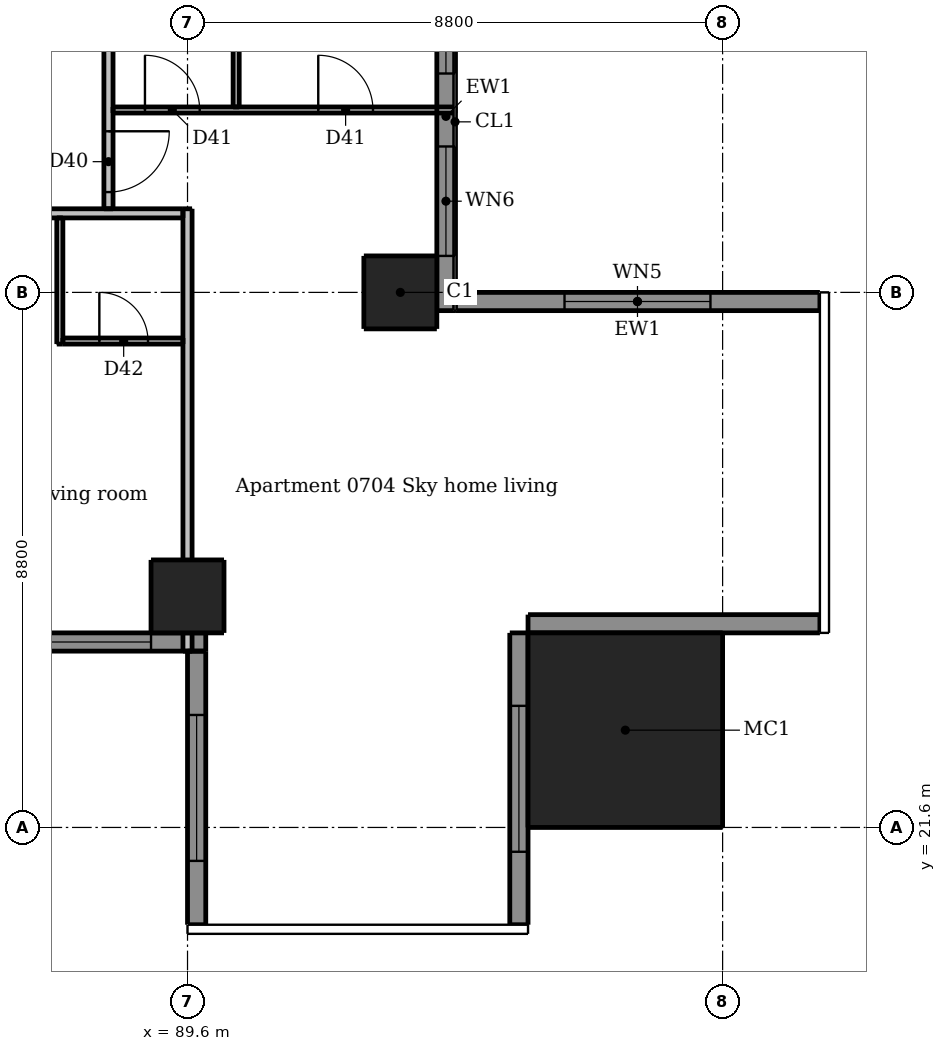
"""IFC4 building model, lengths in metres.
Left out: names, types, materials, properties, quantities, classifications, styles, units other than length and angle.
Written with IfcOpenShell. Run it as: python <this file> out.ifc"""

import sys

from ifc_helpers import new_model, si_unit, direction, frame, frame_2d, origin, origin_2d, place, context, subcontext, project, spatial, rectangle, extrude, element, fill, save


model = new_model("IFC4")
c1 = context("Model", 3, precision=1e-05, world=origin(), true_north=direction((0.0, 1.0)))
c2 = subcontext(c1, "Body", "Model", "MODEL_VIEW")
j1 = project(units=[si_unit("LENGTHUNIT", "METRE"), si_unit("PLANEANGLEUNIT", "RADIAN")], contexts=[c1])
p1 = place(None, origin())
s1 = spatial("IfcSite", under=j1, at=p1, CompositionType="ELEMENT")
p2 = place(p1, origin())
s2 = spatial("IfcBuilding", under=s1, at=p2, CompositionType="ELEMENT")
p3 = place(p2, frame((0.0, 0.0, 30.1)))
s3 = spatial("IfcBuildingStorey", under=s2, at=p3, CompositionType="ELEMENT", Elevation=30.1)
for number, where, z_axis, x_axis in (
    (1, (89.6, 25.4, 0.0), (0.0, 0.0, 1.0), (1.0, 0.0, 0.0)),
    (2, (93.1, 30.4, 0.0), (0.0, 0.0, 1.0), (1.0, 0.0, 0.0)),
):
    element("IfcColumn", number, at=place(p3, frame(where, z_axis=z_axis, x_axis=x_axis)), inside=s3, PredefinedType="COLUMN", context=c2, shape_type="SweptSolid", body=[
        extrude(rectangle(XDim=1.2, YDim=1.2, at=origin_2d()), origin(), (0.0, 0.0, 1.0), 3.05),
    ])
p4 = place(p3, frame((96.8, 23.2, 0.0), z_axis=(0.0, 0.0, 1.0), x_axis=(1.0, 0.0, 0.0)))
e3 = element("IfcColumn", 3, at=p4, inside=s3, PredefinedType="COLUMN", context=c2, shape_type="SweptSolid", body=[
    extrude(rectangle(XDim=3.2, YDim=3.2, at=origin_2d()), origin(), (0.0, 0.0, 1.0), 3.3),
])
p5 = place(p3, frame((89.75, 24.5, 0.0), z_axis=(0.0, 0.0, 1.0), x_axis=(0.0, -1.0, 0.0)))
e4 = element("IfcWall", 4, at=p5, inside=s3, PredefinedType="SOLIDWALL", context=c2, shape_type="SweptSolid", body=[
    extrude(rectangle(XDim=4.5, YDim=0.3, at=frame_2d((2.25, 0.0))), origin(), (0.0, 0.0, 1.0), 3.05),
])
p6 = place(p5, frame((1.05, 0.0, 0.15)))
e5 = element("IfcOpeningElement", 5, at=p6, cuts=e4, PredefinedType="OPENING", context=c2, shape_type="SweptSolid", body=[
    extrude(rectangle(XDim=2.4, YDim=2.1, at=frame_2d((1.2, 1.05))), frame((0.0, 0.16, 0.0), z_axis=(0.0, -1.0, 0.0), x_axis=(1.0, 0.0, 0.0)), (0.0, 0.0, 1.0), 0.32),
])
p7 = place(p3, frame((95.05, 20.0, 0.0), z_axis=(0.0, 0.0, 1.0), x_axis=(0.0, 1.0, 0.0)))
e6 = element("IfcWall", 6, at=p7, inside=s3, PredefinedType="SOLIDWALL", context=c2, shape_type="SweptSolid", body=[
    extrude(rectangle(XDim=4.8, YDim=0.3, at=frame_2d((2.4, 0.0))), origin(), (0.0, 0.0, 1.0), 3.05),
])
p8 = place(p7, frame((1.2, 0.0, 0.15)))
e7 = element("IfcOpeningElement", 7, at=p8, cuts=e6, PredefinedType="OPENING", context=c2, shape_type="SweptSolid", body=[
    extrude(rectangle(XDim=2.4, YDim=2.1, at=frame_2d((1.2, 1.05))), frame((0.0, 0.16, 0.0), z_axis=(0.0, -1.0, 0.0), x_axis=(1.0, 0.0, 0.0)), (0.0, 0.0, 1.0), 0.32),
])
p9 = place(p3, frame((95.2, 24.95, 0.0), z_axis=(0.0, 0.0, 1.0), x_axis=(1.0, 0.0, 0.0)))
e8 = element("IfcWall", 8, at=p9, inside=s3, PredefinedType="SOLIDWALL", context=c2, shape_type="SweptSolid", body=[
    extrude(rectangle(XDim=4.8, YDim=0.3, at=frame_2d((2.4, 0.0))), origin(), (0.0, 0.0, 1.0), 3.05),
])
p10 = place(p3, frame((100.0, 30.25, 0.0), z_axis=(0.0, 0.0, 1.0), x_axis=(-1.0, 0.0, 0.0)))
e9 = element("IfcWall", 9, at=p10, inside=s3, PredefinedType="SOLIDWALL", context=c2, shape_type="SweptSolid", body=[
    extrude(rectangle(XDim=6.0, YDim=0.3, at=frame_2d((3.0, 0.0))), origin(), (0.0, 0.0, 1.0), 3.05),
])
p11 = place(p10, frame((1.8, 0.0, 0.15)))
e10 = element("IfcOpeningElement", 10, at=p11, cuts=e9, PredefinedType="OPENING", context=c2, shape_type="SweptSolid", body=[
    extrude(rectangle(XDim=2.4, YDim=2.1, at=frame_2d((1.2, 1.05))), frame((0.0, 0.16, 0.0), z_axis=(0.0, -1.0, 0.0), x_axis=(1.0, 0.0, 0.0)), (0.0, 0.0, 1.0), 0.32),
])
p12 = place(p3, frame((83.9, 24.65, 0.0), z_axis=(0.0, 0.0, 1.0), x_axis=(1.0, 0.0, 0.0)))
e11 = element("IfcWall", 11, at=p12, inside=s3, PredefinedType="SOLIDWALL", context=c2, shape_type="SweptSolid", body=[
    extrude(rectangle(XDim=6.0, YDim=0.3, at=frame_2d((3.0, 0.0))), origin(), (0.0, 0.0, 1.0), 3.05),
])
p13 = place(p12, frame((0.3, 0.0, 0.15)))
e12 = element("IfcOpeningElement", 12, at=p13, cuts=e11, PredefinedType="OPENING", context=c2, shape_type="SweptSolid", body=[
    extrude(rectangle(XDim=1.8, YDim=2.1, at=frame_2d((0.9, 1.05))), frame((0.0, 0.16, 0.0), z_axis=(0.0, -1.0, 0.0), x_axis=(1.0, 0.0, 0.0)), (0.0, 0.0, 1.0), 0.32),
])
p14 = place(p12, frame((3.3, 0.0, 0.15)))
e13 = element("IfcOpeningElement", 13, at=p14, cuts=e11, PredefinedType="OPENING", context=c2, shape_type="SweptSolid", body=[
    extrude(rectangle(XDim=1.8, YDim=2.1, at=frame_2d((0.9, 1.05))), frame((0.0, 0.16, 0.0), z_axis=(0.0, -1.0, 0.0), x_axis=(1.0, 0.0, 0.0)), (0.0, 0.0, 1.0), 0.32),
])
p15 = place(p3, frame((93.85, 30.1, 0.0), z_axis=(0.0, 0.0, 1.0), x_axis=(0.0, 1.0, 0.0)))
e14 = element("IfcWall", 14, at=p15, inside=s3, PredefinedType="SOLIDWALL", context=c2, shape_type="SweptSolid", body=[
    extrude(rectangle(XDim=6.39, YDim=0.3, at=frame_2d((3.195, 0.0))), origin(), (0.0, 0.0, 1.0), 3.05),
])
p16 = place(p15, frame((0.9, 0.0, 0.15)))
e15 = element("IfcOpeningElement", 15, at=p16, cuts=e14, PredefinedType="OPENING", context=c2, shape_type="SweptSolid", body=[
    extrude(rectangle(XDim=1.8, YDim=2.1, at=frame_2d((0.9, 1.05))), frame((0.0, 0.16, 0.0), z_axis=(0.0, -1.0, 0.0), x_axis=(1.0, 0.0, 0.0)), (0.0, 0.0, 1.0), 0.32),
])
p17 = place(p15, frame((3.9, 0.0, 0.15)))
e16 = element("IfcOpeningElement", 16, at=p17, cuts=e14, PredefinedType="OPENING", context=c2, shape_type="SweptSolid", body=[
    extrude(rectangle(XDim=1.8, YDim=2.1, at=frame_2d((0.9, 1.05))), frame((0.0, 0.16, 0.0), z_axis=(0.0, -1.0, 0.0), x_axis=(1.0, 0.0, 0.0)), (0.0, 0.0, 1.0), 0.32),
])
p18 = place(p3, frame((87.5, 29.55, 0.0), z_axis=(0.0, 0.0, 1.0), x_axis=(0.0, 1.0, 0.0)))
e17 = element("IfcWall", 17, at=p18, inside=s3, PredefinedType="PARTITIONING", context=c2, shape_type="SweptSolid", body=[
    extrude(rectangle(XDim=2.075, YDim=0.1, at=frame_2d((1.038, 0.0))), origin(), (0.0, 0.0, 1.0), 3.05),
])
p19 = place(p3, frame((90.4, 33.45, 0.0), z_axis=(0.0, 0.0, 1.0), x_axis=(0.0, 1.0, 0.0)))
e18 = element("IfcWall", 18, at=p19, inside=s3, PredefinedType="PARTITIONING", context=c2, shape_type="SweptSolid", body=[
    extrude(rectangle(XDim=8.5, YDim=0.1, at=frame_2d((4.25, 0.0))), origin(), (0.0, 0.0, 1.0), 3.05),
])
p20 = place(p19, frame((3.8, 0.0, 0.0)))
e19 = element("IfcOpeningElement", 19, at=p20, cuts=e18, PredefinedType="OPENING", context=c2, shape_type="SweptSolid", body=[
    extrude(rectangle(XDim=0.8, YDim=2.1, at=frame_2d((0.4, 1.05))), frame((0.0, 0.06, 0.0), z_axis=(0.0, -1.0, 0.0), x_axis=(1.0, 0.0, 0.0)), (0.0, 0.0, 1.0), 0.12),
])
p21 = place(p19, frame((6.8, 0.0, 0.0)))
e20 = element("IfcOpeningElement", 20, at=p21, cuts=e18, PredefinedType="OPENING", context=c2, shape_type="SweptSolid", body=[
    extrude(rectangle(XDim=0.9, YDim=2.1, at=frame_2d((0.45, 1.05))), frame((0.0, 0.06, 0.0), z_axis=(0.0, -1.0, 0.0), x_axis=(1.0, 0.0, 0.0)), (0.0, 0.0, 1.0), 0.12),
])
p22 = place(p3, frame((88.375, 33.4, 0.0), z_axis=(0.0, 0.0, 1.0), x_axis=(1.0, 0.0, 0.0)))
e21 = element("IfcWall", 21, at=p22, inside=s3, PredefinedType="PARTITIONING", context=c2, shape_type="SweptSolid", body=[
    extrude(rectangle(XDim=5.625, YDim=0.1, at=frame_2d((2.812, 0.0))), origin(), (0.0, 0.0, 1.0), 3.05),
])
p23 = place(p22, frame((0.525, 0.0, 0.0)))
e22 = element("IfcOpeningElement", 22, at=p23, cuts=e21, PredefinedType="OPENING", context=c2, shape_type="SweptSolid", body=[
    extrude(rectangle(XDim=0.9, YDim=2.1, at=frame_2d((0.45, 1.05))), frame((0.0, 0.06, 0.0), z_axis=(0.0, -1.0, 0.0), x_axis=(1.0, 0.0, 0.0)), (0.0, 0.0, 1.0), 0.12),
])
p24 = place(p22, frame((3.375, 0.0, 0.0)))
e23 = element("IfcOpeningElement", 23, at=p24, cuts=e21, PredefinedType="OPENING", context=c2, shape_type="SweptSolid", body=[
    extrude(rectangle(XDim=0.9, YDim=2.1, at=frame_2d((0.45, 1.05))), frame((0.0, 0.06, 0.0), z_axis=(0.0, -1.0, 0.0), x_axis=(1.0, 0.0, 0.0)), (0.0, 0.0, 1.0), 0.12),
])
p25 = place(p3, frame((87.55, 29.6, 0.0), z_axis=(0.0, 0.0, 1.0), x_axis=(1.0, 0.0, 0.0)))
e24 = element("IfcWall", 24, at=p25, inside=s3, PredefinedType="PARTITIONING", context=c2, shape_type="SweptSolid", body=[
    extrude(rectangle(XDim=1.975, YDim=0.1, at=frame_2d((0.987, 0.0))), origin(), (0.0, 0.0, 1.0), 3.05),
])
p26 = place(p25, frame((0.6, 0.0, 0.0)))
e25 = element("IfcOpeningElement", 25, at=p26, cuts=e24, PredefinedType="OPENING", context=c2, shape_type="SweptSolid", body=[
    extrude(rectangle(XDim=0.8, YDim=2.1, at=frame_2d((0.4, 1.05))), frame((0.0, 0.06, 0.0), z_axis=(0.0, -1.0, 0.0), x_axis=(1.0, 0.0, 0.0)), (0.0, 0.0, 1.0), 0.12),
])
p27 = place(p3, frame((88.3, 60.475, 0.0), z_axis=(0.0, 0.0, 1.0), x_axis=(0.0, -1.0, 0.0)))
e26 = element("IfcWall", 26, at=p27, inside=s3, PredefinedType="PARTITIONING", context=c2, shape_type="SweptSolid", body=[
    extrude(rectangle(XDim=28.7, YDim=0.15, at=frame_2d((14.35, 0.0))), origin(), (0.0, 0.0, 1.0), 3.05),
])
p28 = place(p27, frame((27.425, 0.0, 0.0)))
e27 = element("IfcOpeningElement", 27, at=p28, cuts=e26, PredefinedType="OPENING", context=c2, shape_type="SweptSolid", body=[
    extrude(rectangle(XDim=1.0, YDim=2.1, at=frame_2d((0.5, 1.05))), frame((0.0, 0.085, 0.0), z_axis=(0.0, -1.0, 0.0), x_axis=(1.0, 0.0, 0.0)), (0.0, 0.0, 1.0), 0.17),
])
p29 = place(p27, frame((16.325, 0.0, 0.0)))
e28 = element("IfcOpeningElement", 28, at=p29, cuts=e26, PredefinedType="OPENING", context=c2, shape_type="SweptSolid", body=[
    extrude(rectangle(XDim=1.0, YDim=2.1, at=frame_2d((0.5, 1.05))), frame((0.0, 0.085, 0.0), z_axis=(0.0, -1.0, 0.0), x_axis=(1.0, 0.0, 0.0)), (0.0, 0.0, 1.0), 0.17),
])
p30 = place(p27, frame((5.525, 0.0, 0.0)))
e29 = element("IfcOpeningElement", 29, at=p30, cuts=e26, PredefinedType="OPENING", context=c2, shape_type="SweptSolid", body=[
    extrude(rectangle(XDim=1.0, YDim=2.1, at=frame_2d((0.5, 1.05))), frame((0.0, 0.085, 0.0), z_axis=(0.0, -1.0, 0.0), x_axis=(1.0, 0.0, 0.0)), (0.0, 0.0, 1.0), 0.17),
])
p31 = place(p3, frame((89.6, 24.5, 0.0), z_axis=(0.0, 0.0, 1.0), x_axis=(0.0, 1.0, 0.0)))
e30 = element("IfcWall", 30, at=p31, inside=s3, PredefinedType="PARTITIONING", context=c2, shape_type="SweptSolid", body=[
    extrude(rectangle(XDim=7.275, YDim=0.15, at=frame_2d((3.637, 0.0))), origin(), (0.0, 0.0, 1.0), 2.516),
])
p32 = place(p3, frame((89.525, 31.7, 0.0), z_axis=(0.0, 0.0, 1.0), x_axis=(-1.0, 0.0, 0.0)))
e31 = element("IfcWall", 31, at=p32, inside=s3, PredefinedType="PARTITIONING", context=c2, shape_type="SweptSolid", body=[
    extrude(rectangle(XDim=28.75, YDim=0.15, at=frame_2d((14.375, 0.0))), origin(), (0.0, 0.0, 1.0), 3.05),
])
p33 = place(p32, frame((24.625, 0.0, 0.0)))
e32 = element("IfcOpeningElement", 32, at=p33, cuts=e31, PredefinedType="OPENING", context=c2, shape_type="SweptSolid", body=[
    extrude(rectangle(XDim=1.0, YDim=2.1, at=frame_2d((0.5, 1.05))), frame((0.0, 0.085, 0.0), z_axis=(0.0, -1.0, 0.0), x_axis=(1.0, 0.0, 0.0)), (0.0, 0.0, 1.0), 0.17),
])
p34 = place(p32, frame((10.225, 0.0, 0.0)))
e33 = element("IfcOpeningElement", 33, at=p34, cuts=e31, PredefinedType="OPENING", context=c2, shape_type="SweptSolid", body=[
    extrude(rectangle(XDim=1.0, YDim=2.1, at=frame_2d((0.5, 1.05))), frame((0.0, 0.085, 0.0), z_axis=(0.0, -1.0, 0.0), x_axis=(1.0, 0.0, 0.0)), (0.0, 0.0, 1.0), 0.17),
])
p35 = place(p32, frame((2.425, 0.0, 0.0)))
e34 = element("IfcOpeningElement", 34, at=p35, cuts=e31, PredefinedType="OPENING", context=c2, shape_type="SweptSolid", body=[
    extrude(rectangle(XDim=1.0, YDim=2.1, at=frame_2d((0.5, 1.05))), frame((0.0, 0.085, 0.0), z_axis=(0.0, -1.0, 0.0), x_axis=(1.0, 0.0, 0.0)), (0.0, 0.0, 1.0), 0.17),
])
p36 = place(p6, origin())
e35 = element("IfcWindow", 35, at=p36, inside=s3, PartitioningType="DOUBLE_PANEL_VERTICAL", PredefinedType="WINDOW", context=c2, shape_type="SweptSolid", body=[
    extrude(rectangle(XDim=2.4, YDim=2.1, at=frame_2d((1.2, 1.05))), frame((0.0, 0.03, 0.0), z_axis=(0.0, -1.0, 0.0), x_axis=(1.0, 0.0, 0.0)), (0.0, 0.0, 1.0), 0.06),
])
fill(e5, e35)
p37 = place(p8, origin())
e36 = element("IfcWindow", 36, at=p37, inside=s3, PartitioningType="DOUBLE_PANEL_VERTICAL", PredefinedType="WINDOW", context=c2, shape_type="SweptSolid", body=[
    extrude(rectangle(XDim=2.4, YDim=2.1, at=frame_2d((1.2, 1.05))), frame((0.0, 0.03, 0.0), z_axis=(0.0, -1.0, 0.0), x_axis=(1.0, 0.0, 0.0)), (0.0, 0.0, 1.0), 0.06),
])
fill(e7, e36)
p38 = place(p11, origin())
e37 = element("IfcWindow", 37, at=p38, inside=s3, PartitioningType="DOUBLE_PANEL_VERTICAL", PredefinedType="WINDOW", context=c2, shape_type="SweptSolid", body=[
    extrude(rectangle(XDim=2.4, YDim=2.1, at=frame_2d((1.2, 1.05))), frame((0.0, 0.03, 0.0), z_axis=(0.0, -1.0, 0.0), x_axis=(1.0, 0.0, 0.0)), (0.0, 0.0, 1.0), 0.06),
])
fill(e10, e37)
p39 = place(p14, origin())
e38 = element("IfcWindow", 38, at=p39, inside=s3, PartitioningType="DOUBLE_PANEL_VERTICAL", PredefinedType="WINDOW", context=c2, shape_type="SweptSolid", body=[
    extrude(rectangle(XDim=1.8, YDim=2.1, at=frame_2d((0.9, 1.05))), frame((0.0, 0.03, 0.0), z_axis=(0.0, -1.0, 0.0), x_axis=(1.0, 0.0, 0.0)), (0.0, 0.0, 1.0), 0.06),
])
fill(e13, e38)
p40 = place(p16, origin())
e39 = element("IfcWindow", 39, at=p40, inside=s3, PartitioningType="DOUBLE_PANEL_VERTICAL", PredefinedType="WINDOW", context=c2, shape_type="SweptSolid", body=[
    extrude(rectangle(XDim=1.8, YDim=2.1, at=frame_2d((0.9, 1.05))), frame((0.0, 0.03, 0.0), z_axis=(0.0, -1.0, 0.0), x_axis=(1.0, 0.0, 0.0)), (0.0, 0.0, 1.0), 0.06),
])
fill(e15, e39)
p41 = place(p17, origin())
e40 = element("IfcWindow", 40, at=p41, inside=s3, PartitioningType="DOUBLE_PANEL_VERTICAL", PredefinedType="WINDOW", context=c2, shape_type="SweptSolid", body=[
    extrude(rectangle(XDim=1.8, YDim=2.1, at=frame_2d((0.9, 1.05))), frame((0.0, 0.03, 0.0), z_axis=(0.0, -1.0, 0.0), x_axis=(1.0, 0.0, 0.0)), (0.0, 0.0, 1.0), 0.06),
])
fill(e16, e40)
p42 = place(p26, origin())
e41 = element("IfcDoor", 41, at=p42, inside=s3, OperationType="SINGLE_SWING_LEFT", PredefinedType="DOOR", context=c2, shape_type="SweptSolid", body=[
    extrude(rectangle(XDim=0.8, YDim=2.1, at=frame_2d((0.4, 1.05))), frame((0.0, 0.025, 0.0), z_axis=(0.0, -1.0, 0.0), x_axis=(1.0, 0.0, 0.0)), (0.0, 0.0, 1.0), 0.05),
])
fill(e25, e41)
p43 = place(p28, origin())
e42 = element("IfcDoor", 42, at=p43, inside=s3, OperationType="SINGLE_SWING_LEFT", PredefinedType="DOOR", context=c2, shape_type="SweptSolid", body=[
    extrude(rectangle(XDim=1.0, YDim=2.1, at=frame_2d((0.5, 1.05))), frame((0.0, 0.025, 0.0), z_axis=(0.0, -1.0, 0.0), x_axis=(1.0, 0.0, 0.0)), (0.0, 0.0, 1.0), 0.05),
])
fill(e27, e42)
p44 = place(p23, origin())
e43 = element("IfcDoor", 43, at=p44, inside=s3, OperationType="SINGLE_SWING_LEFT", PredefinedType="DOOR", context=c2, shape_type="SweptSolid", body=[
    extrude(rectangle(XDim=0.9, YDim=2.1, at=frame_2d((0.45, 1.05))), frame((0.0, 0.025, 0.0), z_axis=(0.0, -1.0, 0.0), x_axis=(1.0, 0.0, 0.0)), (0.0, 0.0, 1.0), 0.05),
])
fill(e22, e43)
p45 = place(p24, origin())
e44 = element("IfcDoor", 44, at=p45, inside=s3, OperationType="SINGLE_SWING_LEFT", PredefinedType="DOOR", context=c2, shape_type="SweptSolid", body=[
    extrude(rectangle(XDim=0.9, YDim=2.1, at=frame_2d((0.45, 1.05))), frame((0.0, 0.025, 0.0), z_axis=(0.0, -1.0, 0.0), x_axis=(1.0, 0.0, 0.0)), (0.0, 0.0, 1.0), 0.05),
])
fill(e23, e44)
save(model, sys.argv[1])
